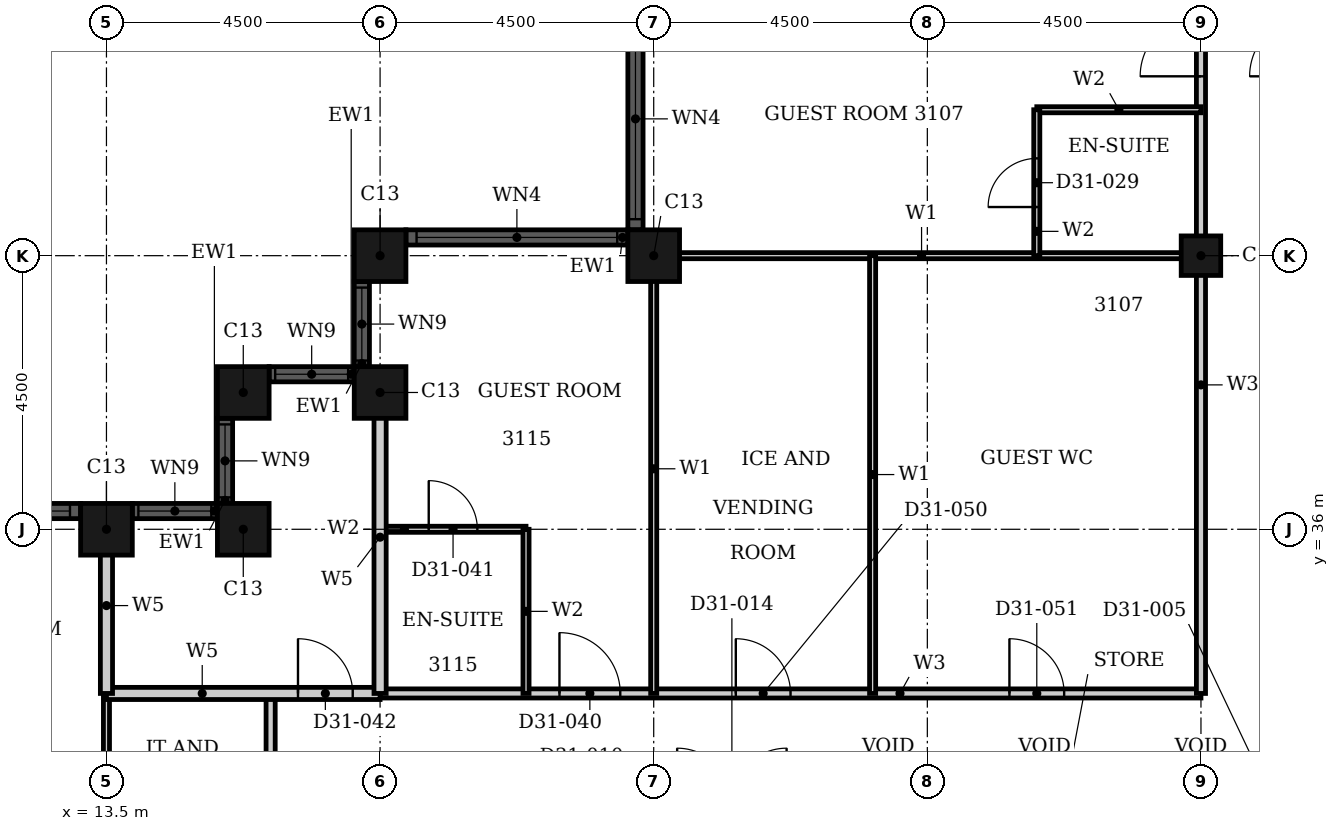
"""IFC4 building model, lengths in metres.
Left out: names, types, materials, properties, quantities, classifications, styles, units other than length and angle.
Written with IfcOpenShell. Run it as: python <this file> out.ifc"""

import sys

from ifc_helpers import new_model, si_unit, direction, frame, frame_2d, origin, origin_2d, place, context, subcontext, project, spatial, rectangle, hollow_rectangle, extrude, element, fill, save


model = new_model("IFC4")
c1 = context("Model", 3, precision=1e-05, world=origin(), true_north=direction((0.0, 1.0)))
c2 = subcontext(c1, "Body", "Model", "MODEL_VIEW")
j1 = project(units=[si_unit("LENGTHUNIT", "METRE"), si_unit("PLANEANGLEUNIT", "RADIAN")], contexts=[c1])
p1 = place(None, origin())
s1 = spatial("IfcSite", under=j1, at=p1, CompositionType="ELEMENT")
p2 = place(p1, origin())
s2 = spatial("IfcBuilding", under=s1, at=p2, CompositionType="ELEMENT")
p3 = place(p2, frame((0.0, 0.0, 126.0)))
s3 = spatial("IfcBuildingStorey", under=s2, at=p3, CompositionType="ELEMENT", Elevation=126.0)
for number, where, z_axis, x_axis in (
    (1, (22.5, 40.5, 0.0), (0.0, 0.0, 1.0), (1.0, 0.0, 0.0)),
    (2, (18.0, 40.5, 0.0), (0.0, 0.0, 1.0), (1.0, 0.0, 0.0)),
    (3, (18.0, 38.25, 0.0), (0.0, 0.0, 1.0), (1.0, 0.0, 0.0)),
    (4, (15.75, 38.25, 0.0), (0.0, 0.0, 1.0), (1.0, 0.0, 0.0)),
    (5, (15.75, 36.0, 0.0), (0.0, 0.0, 1.0), (1.0, 0.0, 0.0)),
    (6, (13.5, 36.0, 0.0), (0.0, 0.0, 1.0), (1.0, 0.0, 0.0)),
):
    element("IfcColumn", number, at=place(p3, frame(where, z_axis=z_axis, x_axis=x_axis)), inside=s3, PredefinedType="COLUMN", context=c2, shape_type="SweptSolid", body=[
        extrude(hollow_rectangle(XDim=0.85, YDim=0.85, WallThickness=0.026, at=origin_2d()), origin(), (0.0, 0.0, 1.0), 3.6),
    ])
p4 = place(p3, frame((31.5, 40.5, 0.0), z_axis=(0.0, 0.0, 1.0), x_axis=(1.0, 0.0, 0.0)))
e7 = element("IfcColumn", 7, at=p4, inside=s3, PredefinedType="COLUMN", context=c2, shape_type="SweptSolid", body=[
    extrude(hollow_rectangle(XDim=0.65, YDim=0.65, WallThickness=0.021, at=origin_2d()), origin(), (0.0, 0.0, 1.0), 3.6),
])
p5 = place(p3, frame((22.2, 49.075, 0.0), z_axis=(0.0, 0.0, 1.0), x_axis=(0.0, -1.0, 0.0)))
e8 = element("IfcWall", 8, at=p5, inside=s3, PredefinedType="SOLIDWALL", context=c2, shape_type="SweptSolid", body=[
    extrude(rectangle(XDim=8.15, YDim=0.25, at=frame_2d((4.075, 0.0))), origin(), (0.0, 0.0, 1.0), 3.6),
])
p6 = place(p5, frame((0.175, 0.0, 0.9)))
e9 = element("IfcOpeningElement", 9, at=p6, cuts=e8, PredefinedType="OPENING", context=c2, shape_type="SweptSolid", body=[
    extrude(rectangle(XDim=3.3, YDim=2.08, at=frame_2d((1.65, 1.04))), frame((0.0, 0.135, 0.0), z_axis=(0.0, -1.0, 0.0), x_axis=(1.0, 0.0, 0.0)), (0.0, 0.0, 1.0), 0.27),
])
p7 = place(p5, frame((4.675, 0.0, 0.9)))
e10 = element("IfcOpeningElement", 10, at=p7, cuts=e8, PredefinedType="OPENING", context=c2, shape_type="SweptSolid", body=[
    extrude(rectangle(XDim=3.3, YDim=2.08, at=frame_2d((1.65, 1.04))), frame((0.0, 0.135, 0.0), z_axis=(0.0, -1.0, 0.0), x_axis=(1.0, 0.0, 0.0)), (0.0, 0.0, 1.0), 0.27),
])
p8 = place(p3, frame((22.075, 40.8, 0.0), z_axis=(0.0, 0.0, 1.0), x_axis=(-1.0, 0.0, 0.0)))
e11 = element("IfcWall", 11, at=p8, inside=s3, PredefinedType="SOLIDWALL", context=c2, shape_type="SweptSolid", body=[
    extrude(rectangle(XDim=3.65, YDim=0.25, at=frame_2d((1.825, 0.0))), origin(), (0.0, 0.0, 1.0), 3.6),
])
p9 = place(p8, frame((0.175, 0.0, 0.9)))
e12 = element("IfcOpeningElement", 12, at=p9, cuts=e11, PredefinedType="OPENING", context=c2, shape_type="SweptSolid", body=[
    extrude(rectangle(XDim=3.3, YDim=2.08, at=frame_2d((1.65, 1.04))), frame((0.0, 0.135, 0.0), z_axis=(0.0, -1.0, 0.0), x_axis=(1.0, 0.0, 0.0)), (0.0, 0.0, 1.0), 0.27),
])
p10 = place(p3, frame((17.7, 40.075, 0.0), z_axis=(0.0, 0.0, 1.0), x_axis=(0.0, -1.0, 0.0)))
e13 = element("IfcWall", 13, at=p10, inside=s3, PredefinedType="SOLIDWALL", context=c2, shape_type="SweptSolid", body=[
    extrude(rectangle(XDim=1.4, YDim=0.25, at=frame_2d((0.7, 0.0))), origin(), (0.0, 0.0, 1.0), 3.6),
])
p11 = place(p10, frame((0.1, 0.0, 0.9)))
e14 = element("IfcOpeningElement", 14, at=p11, cuts=e13, PredefinedType="OPENING", context=c2, shape_type="SweptSolid", body=[
    extrude(rectangle(XDim=1.2, YDim=2.08, at=frame_2d((0.6, 1.04))), frame((0.0, 0.135, 0.0), z_axis=(0.0, -1.0, 0.0), x_axis=(1.0, 0.0, 0.0)), (0.0, 0.0, 1.0), 0.27),
])
p12 = place(p3, frame((17.575, 38.55, 0.0), z_axis=(0.0, 0.0, 1.0), x_axis=(-1.0, 0.0, 0.0)))
e15 = element("IfcWall", 15, at=p12, inside=s3, PredefinedType="SOLIDWALL", context=c2, shape_type="SweptSolid", body=[
    extrude(rectangle(XDim=1.4, YDim=0.25, at=frame_2d((0.7, 0.0))), origin(), (0.0, 0.0, 1.0), 3.6),
])
p13 = place(p12, frame((0.1, 0.0, 0.9)))
e16 = element("IfcOpeningElement", 16, at=p13, cuts=e15, PredefinedType="OPENING", context=c2, shape_type="SweptSolid", body=[
    extrude(rectangle(XDim=1.2, YDim=2.08, at=frame_2d((0.6, 1.04))), frame((0.0, 0.135, 0.0), z_axis=(0.0, -1.0, 0.0), x_axis=(1.0, 0.0, 0.0)), (0.0, 0.0, 1.0), 0.27),
])
p14 = place(p3, frame((15.45, 37.825, 0.0), z_axis=(0.0, 0.0, 1.0), x_axis=(0.0, -1.0, 0.0)))
e17 = element("IfcWall", 17, at=p14, inside=s3, PredefinedType="SOLIDWALL", context=c2, shape_type="SweptSolid", body=[
    extrude(rectangle(XDim=1.4, YDim=0.25, at=frame_2d((0.7, 0.0))), origin(), (0.0, 0.0, 1.0), 3.6),
])
p15 = place(p14, frame((0.1, 0.0, 0.9)))
e18 = element("IfcOpeningElement", 18, at=p15, cuts=e17, PredefinedType="OPENING", context=c2, shape_type="SweptSolid", body=[
    extrude(rectangle(XDim=1.2, YDim=2.08, at=frame_2d((0.6, 1.04))), frame((0.0, 0.135, 0.0), z_axis=(0.0, -1.0, 0.0), x_axis=(1.0, 0.0, 0.0)), (0.0, 0.0, 1.0), 0.27),
])
p16 = place(p3, frame((15.325, 36.3, 0.0), z_axis=(0.0, 0.0, 1.0), x_axis=(-1.0, 0.0, 0.0)))
e19 = element("IfcWall", 19, at=p16, inside=s3, PredefinedType="SOLIDWALL", context=c2, shape_type="SweptSolid", body=[
    extrude(rectangle(XDim=1.4, YDim=0.25, at=frame_2d((0.7, 0.0))), origin(), (0.0, 0.0, 1.0), 3.6),
])
p17 = place(p16, frame((0.1, 0.0, 0.9)))
e20 = element("IfcOpeningElement", 20, at=p17, cuts=e19, PredefinedType="OPENING", context=c2, shape_type="SweptSolid", body=[
    extrude(rectangle(XDim=1.2, YDim=2.08, at=frame_2d((0.6, 1.04))), frame((0.0, 0.135, 0.0), z_axis=(0.0, -1.0, 0.0), x_axis=(1.0, 0.0, 0.0)), (0.0, 0.0, 1.0), 0.27),
])
p18 = place(p3, frame((13.075, 36.3, 0.0), z_axis=(0.0, 0.0, 1.0), x_axis=(-1.0, 0.0, 0.0)))
e21 = element("IfcWall", 21, at=p18, inside=s3, PredefinedType="SOLIDWALL", context=c2, shape_type="SweptSolid", body=[
    extrude(rectangle(XDim=8.15, YDim=0.25, at=frame_2d((4.075, 0.0))), origin(), (0.0, 0.0, 1.0), 3.6),
])
p19 = place(p18, frame((0.175, 0.0, 0.9)))
e22 = element("IfcOpeningElement", 22, at=p19, cuts=e21, PredefinedType="OPENING", context=c2, shape_type="SweptSolid", body=[
    extrude(rectangle(XDim=3.3, YDim=2.08, at=frame_2d((1.65, 1.04))), frame((0.0, 0.135, 0.0), z_axis=(0.0, -1.0, 0.0), x_axis=(1.0, 0.0, 0.0)), (0.0, 0.0, 1.0), 0.27),
])
p20 = place(p18, frame((4.675, 0.0, 0.9)))
e23 = element("IfcOpeningElement", 23, at=p20, cuts=e21, PredefinedType="OPENING", context=c2, shape_type="SweptSolid", body=[
    extrude(rectangle(XDim=3.3, YDim=2.08, at=frame_2d((1.65, 1.04))), frame((0.0, 0.135, 0.0), z_axis=(0.0, -1.0, 0.0), x_axis=(1.0, 0.0, 0.0)), (0.0, 0.0, 1.0), 0.27),
])
p21 = place(p3, frame((18.0, 33.3, 0.0), z_axis=(0.0, 0.0, 1.0), x_axis=(1.0, 0.0, 0.0)))
e24 = element("IfcWall", 24, at=p21, inside=s3, PredefinedType="PARTITIONING", context=c2, shape_type="SweptSolid", body=[
    extrude(rectangle(XDim=13.5, YDim=0.15, at=frame_2d((6.75, 0.0))), origin(), (0.0, 0.0, 1.0), 3.3),
])
p22 = place(p21, frame((2.95, 0.0, 0.0)))
e25 = element("IfcOpeningElement", 25, at=p22, cuts=e24, PredefinedType="OPENING", context=c2, shape_type="SweptSolid", body=[
    extrude(rectangle(XDim=1.0, YDim=2.1, at=frame_2d((0.5, 1.05))), frame((0.0, 0.085, 0.0), z_axis=(0.0, -1.0, 0.0), x_axis=(1.0, 0.0, 0.0)), (0.0, 0.0, 1.0), 0.17),
])
p23 = place(p21, frame((5.85, 0.0, 0.0)))
e26 = element("IfcOpeningElement", 26, at=p23, cuts=e24, PredefinedType="OPENING", context=c2, shape_type="SweptSolid", body=[
    extrude(rectangle(XDim=0.9, YDim=2.1, at=frame_2d((0.45, 1.05))), frame((0.0, 0.085, 0.0), z_axis=(0.0, -1.0, 0.0), x_axis=(1.0, 0.0, 0.0)), (0.0, 0.0, 1.0), 0.17),
])
p24 = place(p21, frame((10.35, 0.0, 0.0)))
e27 = element("IfcOpeningElement", 27, at=p24, cuts=e24, PredefinedType="OPENING", context=c2, shape_type="SweptSolid", body=[
    extrude(rectangle(XDim=0.9, YDim=2.1, at=frame_2d((0.45, 1.05))), frame((0.0, 0.085, 0.0), z_axis=(0.0, -1.0, 0.0), x_axis=(1.0, 0.0, 0.0)), (0.0, 0.0, 1.0), 0.17),
])
p25 = place(p3, frame((16.2, 27.0, 0.0), z_axis=(0.0, 0.0, 1.0), x_axis=(0.0, 1.0, 0.0)))
e28 = element("IfcWall", 28, at=p25, inside=s3, PredefinedType="PARTITIONING", context=c2, shape_type="SweptSolid", body=[
    extrude(rectangle(XDim=6.3, YDim=0.15, at=frame_2d((3.15, 0.0))), origin(), (0.0, 0.0, 1.0), 3.3),
])
p26 = place(p25, frame((2.55, 0.0, 0.0)))
e29 = element("IfcOpeningElement", 29, at=p26, cuts=e28, PredefinedType="OPENING", context=c2, shape_type="SweptSolid", body=[
    extrude(rectangle(XDim=0.9, YDim=2.1, at=frame_2d((0.45, 1.05))), frame((0.0, 0.085, 0.0), z_axis=(0.0, -1.0, 0.0), x_axis=(1.0, 0.0, 0.0)), (0.0, 0.0, 1.0), 0.17),
])
p27 = place(p3, frame((31.5, 33.3, 0.0), z_axis=(0.0, 0.0, 1.0), x_axis=(0.0, 1.0, 0.0)))
e30 = element("IfcWall", 30, at=p27, inside=s3, PredefinedType="PARTITIONING", context=c2, shape_type="SweptSolid", body=[
    extrude(rectangle(XDim=11.7, YDim=0.15, at=frame_2d((5.85, 0.0))), origin(), (0.0, 0.0, 1.0), 2.58),
])
p28 = place(p27, frame((10.15, 0.0, 0.0)))
e31 = element("IfcOpeningElement", 31, at=p28, cuts=e30, PredefinedType="OPENING", context=c2, shape_type="SweptSolid", body=[
    extrude(rectangle(XDim=1.0, YDim=2.1, at=frame_2d((0.5, 1.05))), frame((0.0, 0.085, 0.0), z_axis=(0.0, -1.0, 0.0), x_axis=(1.0, 0.0, 0.0)), (0.0, 0.0, 1.0), 0.17),
])
p29 = place(p3, frame((22.31, 40.5, 0.0), z_axis=(0.0, 0.0, 1.0), x_axis=(1.0, 0.0, 0.0)))
e32 = element("IfcWall", 32, at=p29, inside=s3, PredefinedType="PARTITIONING", context=c2, shape_type="SweptSolid", body=[
    extrude(rectangle(XDim=9.19, YDim=0.1, at=frame_2d((4.595, 0.0))), origin(), (0.0, 0.0, 1.0), 2.38),
])
p30 = place(p3, frame((13.5, 27.0, 0.0), z_axis=(0.0, 0.0, 1.0), x_axis=(0.0, 1.0, 0.0)))
e33 = element("IfcWall", 33, at=p30, inside=s3, PredefinedType="PARTITIONING", context=c2, shape_type="SweptSolid", body=[
    extrude(rectangle(XDim=6.3, YDim=0.1, at=frame_2d((3.15, 0.0))), origin(), (0.0, 0.0, 1.0), 2.38),
])
p31 = place(p3, frame((22.5, 33.3, 0.0), z_axis=(0.0, 0.0, 1.0), x_axis=(0.0, 1.0, 0.0)))
e34 = element("IfcWall", 34, at=p31, inside=s3, PredefinedType="PARTITIONING", context=c2, shape_type="SweptSolid", body=[
    extrude(rectangle(XDim=7.39, YDim=0.1, at=frame_2d((3.695, 0.0))), origin(), (0.0, 0.0, 1.0), 3.3),
])
p32 = place(p3, frame((26.1, 33.3, 0.0), z_axis=(0.0, 0.0, 1.0), x_axis=(0.0, 1.0, 0.0)))
e35 = element("IfcWall", 35, at=p32, inside=s3, PredefinedType="PARTITIONING", context=c2, shape_type="SweptSolid", body=[
    extrude(rectangle(XDim=7.2, YDim=0.1, at=frame_2d((3.6, 0.0))), origin(), (0.0, 0.0, 1.0), 3.3),
])
p33 = place(p3, frame((18.0, 36.0, 0.0), z_axis=(0.0, 0.0, 1.0), x_axis=(1.0, 0.0, 0.0)))
e36 = element("IfcWall", 36, at=p33, inside=s3, PredefinedType="PARTITIONING", context=c2, shape_type="SweptSolid", body=[
    extrude(rectangle(XDim=2.4, YDim=0.1, at=frame_2d((1.2, 0.0))), origin(), (0.0, 0.0, 1.0), 3.3),
])
p34 = place(p33, frame((0.8, 0.0, 0.0)))
e37 = element("IfcOpeningElement", 37, at=p34, cuts=e36, PredefinedType="OPENING", context=c2, shape_type="SweptSolid", body=[
    extrude(rectangle(XDim=0.8, YDim=2.1, at=frame_2d((0.4, 1.05))), frame((0.0, 0.06, 0.0), z_axis=(0.0, -1.0, 0.0), x_axis=(1.0, 0.0, 0.0)), (0.0, 0.0, 1.0), 0.12),
])
for number, where, z_axis, x_axis in (
    (38, (28.8, 42.9, 0.0), (0.0, 0.0, 1.0), (1.0, 0.0, 0.0)),
    (39, (20.4, 33.3, 0.0), (0.0, 0.0, 1.0), (0.0, 1.0, 0.0)),
):
    element("IfcWall", number, at=place(p3, frame(where, z_axis=z_axis, x_axis=x_axis)), inside=s3, PredefinedType="PARTITIONING", context=c2, shape_type="SweptSolid", body=[
        extrude(rectangle(XDim=2.7, YDim=0.1, at=frame_2d((1.35, 0.0))), origin(), (0.0, 0.0, 1.0), 3.3),
    ])
p35 = place(p3, frame((28.8, 40.5, 0.0), z_axis=(0.0, 0.0, 1.0), x_axis=(0.0, 1.0, 0.0)))
e40 = element("IfcWall", 40, at=p35, inside=s3, PredefinedType="PARTITIONING", context=c2, shape_type="SweptSolid", body=[
    extrude(rectangle(XDim=2.4, YDim=0.1, at=frame_2d((1.2, 0.0))), origin(), (0.0, 0.0, 1.0), 3.3),
])
p36 = place(p35, frame((0.8, 0.0, 0.0)))
e41 = element("IfcOpeningElement", 41, at=p36, cuts=e40, PredefinedType="OPENING", context=c2, shape_type="SweptSolid", body=[
    extrude(rectangle(XDim=0.8, YDim=2.1, at=frame_2d((0.4, 1.05))), frame((0.0, 0.06, 0.0), z_axis=(0.0, -1.0, 0.0), x_axis=(1.0, 0.0, 0.0)), (0.0, 0.0, 1.0), 0.12),
])
p37 = place(p3, frame((13.5, 33.3, 0.0), z_axis=(0.0, 0.0, 1.0), x_axis=(1.0, 0.0, 0.0)))
e42 = element("IfcWall", 42, at=p37, inside=s3, PredefinedType="PARTITIONING", context=c2, shape_type="SweptSolid", body=[
    extrude(rectangle(XDim=4.5, YDim=0.2, at=frame_2d((2.25, 0.0))), origin(), (0.0, 0.0, 1.0), 3.3),
])
p38 = place(p37, frame((3.15, 0.0, 0.0)))
e43 = element("IfcOpeningElement", 43, at=p38, cuts=e42, PredefinedType="OPENING", context=c2, shape_type="SweptSolid", body=[
    extrude(rectangle(XDim=0.9, YDim=2.1, at=frame_2d((0.45, 1.05))), frame((0.0, 0.11, 0.0), z_axis=(0.0, -1.0, 0.0), x_axis=(1.0, 0.0, 0.0)), (0.0, 0.0, 1.0), 0.22),
])
p39 = place(p3, frame((13.5, 33.3, 0.0), z_axis=(0.0, 0.0, 1.0), x_axis=(0.0, 1.0, 0.0)))
e44 = element("IfcWall", 44, at=p39, inside=s3, PredefinedType="PARTITIONING", context=c2, shape_type="SweptSolid", body=[
    extrude(rectangle(XDim=2.89, YDim=0.2, at=frame_2d((1.445, 0.0))), origin(), (0.0, 0.0, 1.0), 2.38),
])
p40 = place(p3, frame((18.0, 33.3, 0.0), z_axis=(0.0, 0.0, 1.0), x_axis=(0.0, 1.0, 0.0)))
e45 = element("IfcWall", 45, at=p40, inside=s3, PredefinedType="PARTITIONING", context=c2, shape_type="SweptSolid", body=[
    extrude(rectangle(XDim=5.14, YDim=0.2, at=frame_2d((2.57, 0.0))), origin(), (0.0, 0.0, 1.0), 3.3),
])
p41 = place(p7, origin())
e46 = element("IfcWindow", 46, at=p41, inside=s3, PartitioningType="SINGLE_PANEL", PredefinedType="WINDOW", context=c2, shape_type="SweptSolid", body=[
    extrude(rectangle(XDim=3.3, YDim=2.08, at=frame_2d((1.65, 1.04))), frame((0.0, 0.03, 0.0), z_axis=(0.0, -1.0, 0.0), x_axis=(1.0, 0.0, 0.0)), (0.0, 0.0, 1.0), 0.06),
])
fill(e10, e46)
p42 = place(p9, origin())
e47 = element("IfcWindow", 47, at=p42, inside=s3, PartitioningType="SINGLE_PANEL", PredefinedType="WINDOW", context=c2, shape_type="SweptSolid", body=[
    extrude(rectangle(XDim=3.3, YDim=2.08, at=frame_2d((1.65, 1.04))), frame((0.0, 0.03, 0.0), z_axis=(0.0, -1.0, 0.0), x_axis=(1.0, 0.0, 0.0)), (0.0, 0.0, 1.0), 0.06),
])
fill(e12, e47)
p43 = place(p11, origin())
e48 = element("IfcWindow", 48, at=p43, inside=s3, PartitioningType="SINGLE_PANEL", PredefinedType="WINDOW", context=c2, shape_type="SweptSolid", body=[
    extrude(rectangle(XDim=1.2, YDim=2.08, at=frame_2d((0.6, 1.04))), frame((0.0, 0.03, 0.0), z_axis=(0.0, -1.0, 0.0), x_axis=(1.0, 0.0, 0.0)), (0.0, 0.0, 1.0), 0.06),
])
fill(e14, e48)
p44 = place(p13, origin())
e49 = element("IfcWindow", 49, at=p44, inside=s3, PartitioningType="SINGLE_PANEL", PredefinedType="WINDOW", context=c2, shape_type="SweptSolid", body=[
    extrude(rectangle(XDim=1.2, YDim=2.08, at=frame_2d((0.6, 1.04))), frame((0.0, 0.03, 0.0), z_axis=(0.0, -1.0, 0.0), x_axis=(1.0, 0.0, 0.0)), (0.0, 0.0, 1.0), 0.06),
])
fill(e16, e49)
p45 = place(p15, origin())
e50 = element("IfcWindow", 50, at=p45, inside=s3, PartitioningType="SINGLE_PANEL", PredefinedType="WINDOW", context=c2, shape_type="SweptSolid", body=[
    extrude(rectangle(XDim=1.2, YDim=2.08, at=frame_2d((0.6, 1.04))), frame((0.0, 0.03, 0.0), z_axis=(0.0, -1.0, 0.0), x_axis=(1.0, 0.0, 0.0)), (0.0, 0.0, 1.0), 0.06),
])
fill(e18, e50)
p46 = place(p17, origin())
e51 = element("IfcWindow", 51, at=p46, inside=s3, PartitioningType="SINGLE_PANEL", PredefinedType="WINDOW", context=c2, shape_type="SweptSolid", body=[
    extrude(rectangle(XDim=1.2, YDim=2.08, at=frame_2d((0.6, 1.04))), frame((0.0, 0.03, 0.0), z_axis=(0.0, -1.0, 0.0), x_axis=(1.0, 0.0, 0.0)), (0.0, 0.0, 1.0), 0.06),
])
fill(e20, e51)
p47 = place(p19, origin())
e52 = element("IfcWindow", 52, at=p47, inside=s3, PartitioningType="SINGLE_PANEL", PredefinedType="WINDOW", context=c2, shape_type="SweptSolid", body=[
    extrude(rectangle(XDim=3.3, YDim=2.08, at=frame_2d((1.65, 1.04))), frame((0.0, 0.03, 0.0), z_axis=(0.0, -1.0, 0.0), x_axis=(1.0, 0.0, 0.0)), (0.0, 0.0, 1.0), 0.06),
])
fill(e22, e52)
p48 = place(p28, origin())
e53 = element("IfcDoor", 53, at=p48, inside=s3, OperationType="SINGLE_SWING_RIGHT", PredefinedType="DOOR", context=c2, shape_type="SweptSolid", body=[
    extrude(rectangle(XDim=1.0, YDim=2.1, at=frame_2d((0.5, 1.05))), frame((0.0, 0.025, 0.0), z_axis=(0.0, -1.0, 0.0), x_axis=(1.0, 0.0, 0.0)), (0.0, 0.0, 1.0), 0.05),
])
fill(e31, e53)
p49 = place(p36, origin())
e54 = element("IfcDoor", 54, at=p49, inside=s3, OperationType="SINGLE_SWING_LEFT", PredefinedType="DOOR", context=c2, shape_type="SweptSolid", body=[
    extrude(rectangle(XDim=0.8, YDim=2.1, at=frame_2d((0.4, 1.05))), frame((0.0, 0.025, 0.0), z_axis=(0.0, -1.0, 0.0), x_axis=(1.0, 0.0, 0.0)), (0.0, 0.0, 1.0), 0.05),
])
fill(e41, e54)
p50 = place(p22, origin())
e55 = element("IfcDoor", 55, at=p50, inside=s3, OperationType="SINGLE_SWING_RIGHT", PredefinedType="DOOR", context=c2, shape_type="SweptSolid", body=[
    extrude(rectangle(XDim=1.0, YDim=2.1, at=frame_2d((0.5, 1.05))), frame((0.0, 0.025, 0.0), z_axis=(0.0, -1.0, 0.0), x_axis=(1.0, 0.0, 0.0)), (0.0, 0.0, 1.0), 0.05),
])
fill(e25, e55)
p51 = place(p34, origin())
e56 = element("IfcDoor", 56, at=p51, inside=s3, OperationType="SINGLE_SWING_RIGHT", PredefinedType="DOOR", context=c2, shape_type="SweptSolid", body=[
    extrude(rectangle(XDim=0.8, YDim=2.1, at=frame_2d((0.4, 1.05))), frame((0.0, 0.025, 0.0), z_axis=(0.0, -1.0, 0.0), x_axis=(1.0, 0.0, 0.0)), (0.0, 0.0, 1.0), 0.05),
])
fill(e37, e56)
p52 = place(p38, origin())
e57 = element("IfcDoor", 57, at=p52, inside=s3, OperationType="SINGLE_SWING_RIGHT", PredefinedType="DOOR", context=c2, shape_type="SweptSolid", body=[
    extrude(rectangle(XDim=0.9, YDim=2.1, at=frame_2d((0.45, 1.05))), frame((0.0, 0.025, 0.0), z_axis=(0.0, -1.0, 0.0), x_axis=(1.0, 0.0, 0.0)), (0.0, 0.0, 1.0), 0.05),
])
fill(e43, e57)
p53 = place(p23, origin())
e58 = element("IfcDoor", 58, at=p53, inside=s3, OperationType="SINGLE_SWING_LEFT", PredefinedType="DOOR", context=c2, shape_type="SweptSolid", body=[
    extrude(rectangle(XDim=0.9, YDim=2.1, at=frame_2d((0.45, 1.05))), frame((0.0, 0.025, 0.0), z_axis=(0.0, -1.0, 0.0), x_axis=(1.0, 0.0, 0.0)), (0.0, 0.0, 1.0), 0.05),
])
fill(e26, e58)
p54 = place(p24, origin())
e59 = element("IfcDoor", 59, at=p54, inside=s3, OperationType="SINGLE_SWING_LEFT", PredefinedType="DOOR", context=c2, shape_type="SweptSolid", body=[
    extrude(rectangle(XDim=0.9, YDim=2.1, at=frame_2d((0.45, 1.05))), frame((0.0, 0.025, 0.0), z_axis=(0.0, -1.0, 0.0), x_axis=(1.0, 0.0, 0.0)), (0.0, 0.0, 1.0), 0.05),
])
fill(e27, e59)
save(model, sys.argv[1])
